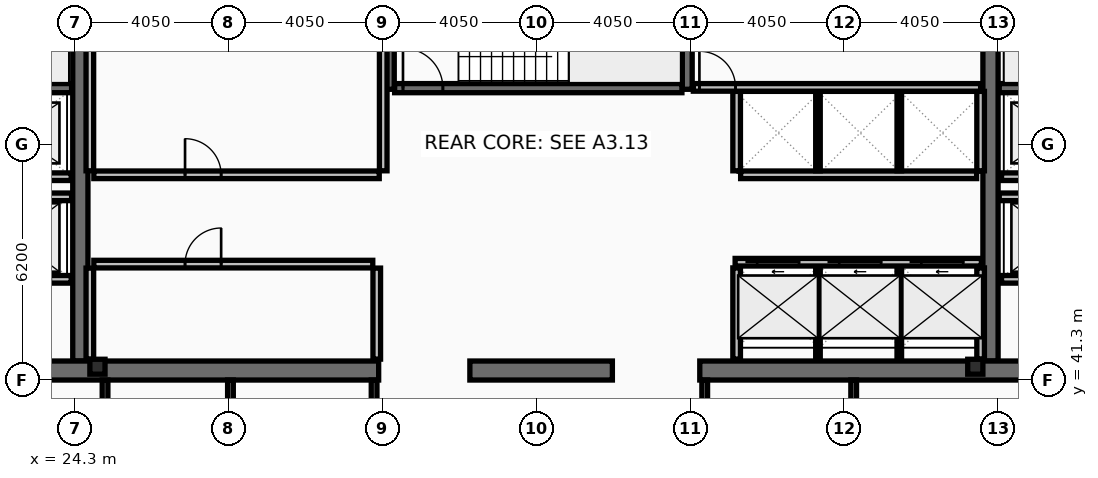
"""IFC4 building model, lengths in metres.
Left out: names, types, materials, properties, quantities, classifications, styles, units other than length and angle.
Written with IfcOpenShell. Run it as: python <this file> out.ifc"""

import sys

from ifc_helpers import new_model, si_unit, direction, frame, frame_2d, origin, origin_2d, place, context, subcontext, project, spatial, rectangle, i_section, extrude, element, fill, save


model = new_model("IFC4")
c1 = context("Model", 3, precision=1e-05, world=origin(), true_north=direction((0.0, 1.0)))
c2 = subcontext(c1, "Body", "Model", "MODEL_VIEW")
j1 = project(units=[si_unit("LENGTHUNIT", "METRE"), si_unit("PLANEANGLEUNIT", "RADIAN")], contexts=[c1])
p1 = place(None, origin())
s1 = spatial("IfcSite", under=j1, at=p1, CompositionType="ELEMENT")
p2 = place(p1, origin())
s2 = spatial("IfcBuilding", under=s1, at=p2, CompositionType="ELEMENT")
p3 = place(p2, frame((0.0, 0.0, 269.8)))
s3 = spatial("IfcBuildingStorey", under=s2, at=p3, CompositionType="ELEMENT", Elevation=269.8)
for number, where, z_axis, x_axis in (
    (1, (24.45, 41.8, 0.0), (0.0, 0.0, 1.0), (0.0, 1.0, 0.0)),
    (2, (48.4, 41.8, 0.0), (0.0, 0.0, 1.0), (0.0, 1.0, 0.0)),
):
    element("IfcWall", number, at=place(p3, frame(where, z_axis=z_axis, x_axis=x_axis)), inside=s3, PredefinedType="SHEAR", context=c2, shape_type="SweptSolid", body=[
        extrude(rectangle(XDim=11.4, YDim=0.4, at=frame_2d((5.7, 0.0))), origin(), (0.0, 0.0, 1.0), 3.44),
    ])
p4 = place(p3, frame((32.3, 41.55, 0.0), z_axis=(0.0, 0.0, 1.0), x_axis=(-1.0, 0.0, 0.0)))
e3 = element("IfcWall", 3, at=p4, inside=s3, PredefinedType="SHEAR", context=c2, shape_type="SweptSolid", body=[
    extrude(rectangle(XDim=11.45, YDim=0.5, at=frame_2d((5.725, 0.0))), origin(), (0.0, 0.0, 1.0), 3.44),
])
p5 = place(p3, frame((38.45, 41.55, 0.0), z_axis=(0.0, 0.0, 1.0), x_axis=(-1.0, 0.0, 0.0)))
e4 = element("IfcWall", 4, at=p5, inside=s3, PredefinedType="SHEAR", context=c2, shape_type="SweptSolid", body=[
    extrude(rectangle(XDim=3.75, YDim=0.5, at=frame_2d((1.875, 0.0))), origin(), (0.0, 0.0, 1.0), 3.44),
])
p6 = place(p3, frame((52.05, 41.55, 0.0), z_axis=(0.0, 0.0, 1.0), x_axis=(-1.0, 0.0, 0.0)))
e5 = element("IfcWall", 5, at=p6, inside=s3, PredefinedType="SHEAR", context=c2, shape_type="SweptSolid", body=[
    extrude(rectangle(XDim=11.3, YDim=0.5, at=frame_2d((5.65, 0.0))), origin(), (0.0, 0.0, 1.0), 3.44),
])
for number, where, z_axis, x_axis in (
    (6, (32.58, 48.95, 0.0), (0.0, 0.0, 1.0), (0.0, 1.0, 0.0)),
    (7, (40.42, 48.95, 0.0), (0.0, 0.0, 1.0), (0.0, 1.0, 0.0)),
):
    element("IfcWall", number, at=place(p3, frame(where, z_axis=z_axis, x_axis=x_axis)), inside=s3, PredefinedType="SHEAR", context=c2, shape_type="SweptSolid", body=[
        extrude(rectangle(XDim=4.25, YDim=0.26, at=frame_2d((2.125, 0.0))), origin(), (0.0, 0.0, 1.0), 3.44),
    ])
p7 = place(p3, frame((16.7, 48.98, 0.0), z_axis=(0.0, 0.0, 1.0), x_axis=(1.0, 0.0, 0.0)))
e8 = element("IfcWall", 8, at=p7, inside=s3, PredefinedType="SHEAR", context=c2, shape_type="SweptSolid", body=[
    extrude(rectangle(XDim=7.52, YDim=0.24, at=frame_2d((3.76, 0.0))), origin(), (0.0, 0.0, 1.0), 3.44),
])
p8 = place(p7, frame((0.22, 0.0, 0.0)))
e9 = element("IfcOpeningElement", 9, at=p8, cuts=e8, PredefinedType="OPENING", context=c2, shape_type="SweptSolid", body=[
    extrude(rectangle(XDim=1.05, YDim=2.15, at=frame_2d((0.525, 1.075))), frame((0.0, 0.13, 0.0), z_axis=(0.0, -1.0, 0.0), x_axis=(1.0, 0.0, 0.0)), (0.0, 0.0, 1.0), 0.26),
])
p9 = place(p3, frame((48.63, 48.98, 0.0), z_axis=(0.0, 0.0, 1.0), x_axis=(1.0, 0.0, 0.0)))
e10 = element("IfcWall", 10, at=p9, inside=s3, PredefinedType="SHEAR", context=c2, shape_type="SweptSolid", body=[
    extrude(rectangle(XDim=7.57, YDim=0.24, at=frame_2d((3.785, 0.0))), origin(), (0.0, 0.0, 1.0), 3.44),
])
p10 = place(p9, frame((6.3, 0.0, 0.0)))
e11 = element("IfcOpeningElement", 11, at=p10, cuts=e10, PredefinedType="OPENING", context=c2, shape_type="SweptSolid", body=[
    extrude(rectangle(XDim=1.05, YDim=2.15, at=frame_2d((0.525, 1.075))), frame((0.0, 0.13, 0.0), z_axis=(0.0, -1.0, 0.0), x_axis=(1.0, 0.0, 0.0)), (0.0, 0.0, 1.0), 0.26),
])
p11 = place(p3, frame((32.72, 48.98, 0.0), z_axis=(0.0, 0.0, 1.0), x_axis=(1.0, 0.0, 0.0)))
e12 = element("IfcWall", 12, at=p11, inside=s3, PredefinedType="SHEAR", context=c2, shape_type="SweptSolid", body=[
    extrude(rectangle(XDim=7.56, YDim=0.24, at=frame_2d((3.78, 0.0))), origin(), (0.0, 0.0, 1.0), 3.44),
])
p12 = place(p11, frame((0.22, 0.0, 0.0)))
e13 = element("IfcOpeningElement", 13, at=p12, cuts=e12, PredefinedType="OPENING", context=c2, shape_type="SweptSolid", body=[
    extrude(rectangle(XDim=1.05, YDim=2.15, at=frame_2d((0.525, 1.075))), frame((0.0, 0.13, 0.0), z_axis=(0.0, -1.0, 0.0), x_axis=(1.0, 0.0, 0.0)), (0.0, 0.0, 1.0), 0.26),
])
for number, where, z_axis, x_axis in (
    (14, (24.9, 41.65, 0.0), (0.0, 0.0, 1.0), (1.0, 0.0, 0.0)),
    (15, (48.0, 41.65, 0.0), (0.0, 0.0, 1.0), (1.0, 0.0, 0.0)),
):
    element("IfcColumn", number, at=place(p3, frame(where, z_axis=z_axis, x_axis=x_axis)), inside=s3, PredefinedType="COLUMN", context=c2, shape_type="SweptSolid", body=[
        extrude(i_section(OverallWidth=0.399, OverallDepth=0.393, WebThickness=0.023, FlangeThickness=0.037, at=origin_2d()), origin(), (0.0, 0.0, 1.0), 3.6),
    ])
p13 = place(p3, frame((41.68, 44.4, 0.0), z_axis=(0.0, 0.0, 1.0), x_axis=(1.0, 0.0, 0.0)))
e16 = element("IfcWall", 16, at=p13, inside=s3, PredefinedType="PARTITIONING", context=c2, shape_type="SweptSolid", body=[
    extrude(rectangle(XDim=6.48, YDim=0.2, at=frame_2d((3.24, 0.0))), origin(), (0.0, 0.0, 1.0), 3.44),
])
p14 = place(p13, frame((0.58, 0.0, 0.0)))
e17 = element("IfcOpeningElement", 17, at=p14, cuts=e16, PredefinedType="OPENING", context=c2, shape_type="SweptSolid", body=[
    extrude(rectangle(XDim=1.1, YDim=2.18, at=frame_2d((0.55, 1.09))), frame((0.0, 0.11, 0.0), z_axis=(0.0, -1.0, 0.0), x_axis=(1.0, 0.0, 0.0)), (0.0, 0.0, 1.0), 0.22),
])
p15 = place(p13, frame((2.74, 0.0, 0.0)))
e18 = element("IfcOpeningElement", 18, at=p15, cuts=e16, PredefinedType="OPENING", context=c2, shape_type="SweptSolid", body=[
    extrude(rectangle(XDim=1.1, YDim=2.18, at=frame_2d((0.55, 1.09))), frame((0.0, 0.11, 0.0), z_axis=(0.0, -1.0, 0.0), x_axis=(1.0, 0.0, 0.0)), (0.0, 0.0, 1.0), 0.22),
])
p16 = place(p13, frame((4.9, 0.0, 0.0)))
e19 = element("IfcOpeningElement", 19, at=p16, cuts=e16, PredefinedType="OPENING", context=c2, shape_type="SweptSolid", body=[
    extrude(rectangle(XDim=1.1, YDim=2.18, at=frame_2d((0.55, 1.09))), frame((0.0, 0.11, 0.0), z_axis=(0.0, -1.0, 0.0), x_axis=(1.0, 0.0, 0.0)), (0.0, 0.0, 1.0), 0.22),
])
p17 = place(p3, frame((51.61, 43.95, 0.0), z_axis=(0.0, 0.0, 1.0), x_axis=(-1.0, 0.0, 0.0)))
e20 = element("IfcWall", 20, at=p17, inside=s3, PredefinedType="PARTITIONING", context=c2, shape_type="SweptSolid", body=[
    extrude(rectangle(XDim=2.92, YDim=0.2, at=frame_2d((1.46, 0.0))), origin(), (0.0, 0.0, 1.0), 3.44),
])
p18 = place(p17, frame((0.81, 0.0, 0.0)))
e21 = element("IfcOpeningElement", 21, at=p18, cuts=e20, PredefinedType="OPENING", context=c2, shape_type="SweptSolid", body=[
    extrude(rectangle(XDim=1.3, YDim=2.18, at=frame_2d((0.65, 1.09))), frame((0.0, 0.11, 0.0), z_axis=(0.0, -1.0, 0.0), x_axis=(1.0, 0.0, 0.0)), (0.0, 0.0, 1.0), 0.22),
])
p19 = place(p3, frame((24.21, 43.95, 0.0), z_axis=(0.0, 0.0, 1.0), x_axis=(-1.0, 0.0, 0.0)))
e22 = element("IfcWall", 22, at=p19, inside=s3, PredefinedType="PARTITIONING", context=c2, shape_type="SweptSolid", body=[
    extrude(rectangle(XDim=2.97, YDim=0.2, at=frame_2d((1.485, 0.0))), origin(), (0.0, 0.0, 1.0), 3.44),
])
p20 = place(p19, frame((0.86, 0.0, 0.0)))
e23 = element("IfcOpeningElement", 23, at=p20, cuts=e22, PredefinedType="OPENING", context=c2, shape_type="SweptSolid", body=[
    extrude(rectangle(XDim=1.3, YDim=2.18, at=frame_2d((0.65, 1.09))), frame((0.0, 0.11, 0.0), z_axis=(0.0, -1.0, 0.0), x_axis=(1.0, 0.0, 0.0)), (0.0, 0.0, 1.0), 0.22),
])
p21 = place(p3, frame((51.61, 46.65, 0.0), z_axis=(0.0, 0.0, 1.0), x_axis=(-1.0, 0.0, 0.0)))
e24 = element("IfcWall", 24, at=p21, inside=s3, PredefinedType="PARTITIONING", context=c2, shape_type="SweptSolid", body=[
    extrude(rectangle(XDim=2.92, YDim=0.2, at=frame_2d((1.46, 0.0))), origin(), (0.0, 0.0, 1.0), 3.44),
])
p22 = place(p21, frame((0.86, 0.0, 0.0)))
e25 = element("IfcOpeningElement", 25, at=p22, cuts=e24, PredefinedType="OPENING", context=c2, shape_type="SweptSolid", body=[
    extrude(rectangle(XDim=1.2, YDim=2.18, at=frame_2d((0.6, 1.09))), frame((0.0, 0.11, 0.0), z_axis=(0.0, -1.0, 0.0), x_axis=(1.0, 0.0, 0.0)), (0.0, 0.0, 1.0), 0.22),
])
p23 = place(p3, frame((24.21, 46.65, 0.0), z_axis=(0.0, 0.0, 1.0), x_axis=(-1.0, 0.0, 0.0)))
e26 = element("IfcWall", 26, at=p23, inside=s3, PredefinedType="PARTITIONING", context=c2, shape_type="SweptSolid", body=[
    extrude(rectangle(XDim=2.97, YDim=0.2, at=frame_2d((1.485, 0.0))), origin(), (0.0, 0.0, 1.0), 3.44),
])
p24 = place(p23, frame((0.91, 0.0, 0.0)))
e27 = element("IfcOpeningElement", 27, at=p24, cuts=e26, PredefinedType="OPENING", context=c2, shape_type="SweptSolid", body=[
    extrude(rectangle(XDim=1.2, YDim=2.18, at=frame_2d((0.6, 1.09))), frame((0.0, 0.11, 0.0), z_axis=(0.0, -1.0, 0.0), x_axis=(1.0, 0.0, 0.0)), (0.0, 0.0, 1.0), 0.22),
])
p25 = place(p3, frame((21.2, 46.12, 0.0), z_axis=(0.0, 0.0, 1.0), x_axis=(1.0, 0.0, 0.0)))
e28 = element("IfcWall", 28, at=p25, inside=s3, PredefinedType="PARTITIONING", context=c2, shape_type="SweptSolid", body=[
    extrude(rectangle(XDim=3.02, YDim=0.2, at=frame_2d((1.51, 0.0))), origin(), (0.0, 0.0, 1.0), 3.44),
])
p26 = place(p3, frame((48.63, 46.12, 0.0), z_axis=(0.0, 0.0, 1.0), x_axis=(1.0, 0.0, 0.0)))
e29 = element("IfcWall", 29, at=p26, inside=s3, PredefinedType="PARTITIONING", context=c2, shape_type="SweptSolid", body=[
    extrude(rectangle(XDim=3.07, YDim=0.2, at=frame_2d((1.535, 0.0))), origin(), (0.0, 0.0, 1.0), 3.44),
])
for number, where, z_axis, x_axis in (
    (30, (24.7, 46.805, 0.0), (0.0, 0.0, 1.0), (0.0, 1.0, 0.0)),
    (31, (32.42, 46.805, 0.0), (0.0, 0.0, 1.0), (0.0, 1.0, 0.0)),
):
    element("IfcWall", number, at=place(p3, frame(where, z_axis=z_axis, x_axis=x_axis)), inside=s3, PredefinedType="PARTITIONING", context=c2, shape_type="SweptSolid", body=[
        extrude(rectangle(XDim=5.99, YDim=0.2, at=frame_2d((2.995, 0.0))), origin(), (0.0, 0.0, 1.0), 3.44),
    ])
p27 = place(p3, frame((24.805, 46.7, 0.0), z_axis=(0.0, 0.0, 1.0), x_axis=(1.0, 0.0, 0.0)))
e32 = element("IfcWall", 32, at=p27, inside=s3, PredefinedType="PARTITIONING", context=c2, shape_type="SweptSolid", body=[
    extrude(rectangle(XDim=7.51, YDim=0.2, at=frame_2d((3.755, 0.0))), origin(), (0.0, 0.0, 1.0), 3.44),
])
p28 = place(p27, frame((2.4, 0.0, 0.0)))
e33 = element("IfcOpeningElement", 33, at=p28, cuts=e32, PredefinedType="OPENING", context=c2, shape_type="SweptSolid", body=[
    extrude(rectangle(XDim=0.95, YDim=2.1, at=frame_2d((0.475, 1.05))), frame((0.0, 0.11, 0.0), z_axis=(0.0, -1.0, 0.0), x_axis=(1.0, 0.0, 0.0)), (0.0, 0.0, 1.0), 0.22),
])
for number, where, z_axis, x_axis in (
    (34, (24.7, 41.85, 0.0), (0.0, 0.0, 1.0), (0.0, 1.0, 0.0)),
    (35, (32.25, 41.85, 0.0), (0.0, 0.0, 1.0), (0.0, 1.0, 0.0)),
):
    element("IfcWall", number, at=place(p3, frame(where, z_axis=z_axis, x_axis=x_axis)), inside=s3, PredefinedType="PARTITIONING", context=c2, shape_type="SweptSolid", body=[
        extrude(rectangle(XDim=2.395, YDim=0.2, at=frame_2d((1.198, 0.0))), origin(), (0.0, 0.0, 1.0), 3.44),
    ])
p29 = place(p3, frame((24.805, 44.35, 0.0), z_axis=(0.0, 0.0, 1.0), x_axis=(1.0, 0.0, 0.0)))
e36 = element("IfcWall", 36, at=p29, inside=s3, PredefinedType="PARTITIONING", context=c2, shape_type="SweptSolid", body=[
    extrude(rectangle(XDim=7.34, YDim=0.2, at=frame_2d((3.67, 0.0))), origin(), (0.0, 0.0, 1.0), 3.44),
])
p30 = place(p29, frame((2.4, 0.0, 0.0)))
e37 = element("IfcOpeningElement", 37, at=p30, cuts=e36, PredefinedType="OPENING", context=c2, shape_type="SweptSolid", body=[
    extrude(rectangle(XDim=0.95, YDim=2.1, at=frame_2d((0.475, 1.05))), frame((0.0, 0.11, 0.0), z_axis=(0.0, -1.0, 0.0), x_axis=(1.0, 0.0, 0.0)), (0.0, 0.0, 1.0), 0.22),
])
p31 = place(p3, frame((41.825, 46.7, 0.0), z_axis=(0.0, 0.0, 1.0), x_axis=(1.0, 0.0, 0.0)))
e38 = element("IfcWall", 38, at=p31, inside=s3, PredefinedType="PARTITIONING", context=c2, shape_type="SweptSolid", body=[
    extrude(rectangle(XDim=6.21, YDim=0.2, at=frame_2d((3.105, 0.0))), origin(), (0.0, 0.0, 1.0), 3.44),
])
for number, where, z_axis, x_axis in (
    (39, (41.72, 46.805, 0.0), (0.0, 0.0, 1.0), (0.0, 1.0, 0.0)),
    (40, (48.14, 46.805, 0.0), (0.0, 0.0, 1.0), (0.0, 1.0, 0.0)),
):
    element("IfcWall", number, at=place(p3, frame(where, z_axis=z_axis, x_axis=x_axis)), inside=s3, PredefinedType="PARTITIONING", context=c2, shape_type="SweptSolid", body=[
        extrude(rectangle(XDim=2.09, YDim=0.2, at=frame_2d((1.045, 0.0))), origin(), (0.0, 0.0, 1.0), 3.44),
    ])
for number, where, z_axis, x_axis in (
    (41, (43.86, 46.805, 0.0), (0.0, 0.0, 1.0), (0.0, 1.0, 0.0)),
    (42, (46.0, 46.805, 0.0), (0.0, 0.0, 1.0), (0.0, 1.0, 0.0)),
):
    element("IfcWall", number, at=place(p3, frame(where, z_axis=z_axis, x_axis=x_axis)), inside=s3, PredefinedType="PARTITIONING", context=c2, shape_type="SweptSolid", body=[
        extrude(rectangle(XDim=2.09, YDim=0.12, at=frame_2d((1.045, 0.0))), origin(), (0.0, 0.0, 1.0), 3.44),
    ])
for number, where, z_axis, x_axis in (
    (43, (41.72, 41.85, 0.0), (0.0, 0.0, 1.0), (0.0, 1.0, 0.0)),
    (44, (48.14, 41.85, 0.0), (0.0, 0.0, 1.0), (0.0, 1.0, 0.0)),
):
    element("IfcWall", number, at=place(p3, frame(where, z_axis=z_axis, x_axis=x_axis)), inside=s3, PredefinedType="PARTITIONING", context=c2, shape_type="SweptSolid", body=[
        extrude(rectangle(XDim=2.4, YDim=0.2, at=frame_2d((1.2, 0.0))), origin(), (0.0, 0.0, 1.0), 3.44),
    ])
for number, where, z_axis, x_axis in (
    (45, (43.86, 41.85, 0.0), (0.0, 0.0, 1.0), (0.0, 1.0, 0.0)),
    (46, (46.0, 41.85, 0.0), (0.0, 0.0, 1.0), (0.0, 1.0, 0.0)),
):
    element("IfcWall", number, at=place(p3, frame(where, z_axis=z_axis, x_axis=x_axis)), inside=s3, PredefinedType="PARTITIONING", context=c2, shape_type="SweptSolid", body=[
        extrude(rectangle(XDim=2.4, YDim=0.12, at=frame_2d((1.2, 0.0))), origin(), (0.0, 0.0, 1.0), 3.44),
    ])
p32 = place(p3, frame((40.58, 49.0, 0.0), z_axis=(0.0, 0.0, 1.0), x_axis=(1.0, 0.0, 0.0)))
e47 = element("IfcWall", 47, at=p32, inside=s3, PredefinedType="PARTITIONING", context=c2, shape_type="SweptSolid", body=[
    extrude(rectangle(XDim=7.56, YDim=0.2, at=frame_2d((3.78, 0.0))), origin(), (0.0, 0.0, 1.0), 3.44),
])
p33 = place(p32, frame((0.16, 0.0, 0.0)))
e48 = element("IfcOpeningElement", 48, at=p33, cuts=e47, PredefinedType="OPENING", context=c2, shape_type="SweptSolid", body=[
    extrude(rectangle(XDim=0.95, YDim=2.1, at=frame_2d((0.475, 1.05))), frame((0.0, 0.11, 0.0), z_axis=(0.0, -1.0, 0.0), x_axis=(1.0, 0.0, 0.0)), (0.0, 0.0, 1.0), 0.22),
])
p34 = place(p3, frame((25.1, 38.28, 0.0), z_axis=(0.0, 0.0, 1.0), x_axis=(0.0, 1.0, 0.0)))
e49 = element("IfcWall", 49, at=p34, inside=s3, PredefinedType="PARTITIONING", context=c2, shape_type="SweptSolid", body=[
    extrude(rectangle(XDim=3.02, YDim=0.15, at=frame_2d((1.51, 0.0))), origin(), (0.0, 0.0, 1.0), 2.78),
])
for number, where, z_axis, x_axis in (
    (50, (28.4, 38.28, 0.0), (0.0, 0.0, 1.0), (0.0, 1.0, 0.0)),
    (51, (32.18, 38.28, 0.0), (0.0, 0.0, 1.0), (0.0, 1.0, 0.0)),
    (52, (40.88, 38.28, 0.0), (0.0, 0.0, 1.0), (0.0, 1.0, 0.0)),
    (53, (44.8, 38.28, 0.0), (0.0, 0.0, 1.0), (0.0, 1.0, 0.0)),
):
    element("IfcWall", number, at=place(p3, frame(where, z_axis=z_axis, x_axis=x_axis)), inside=s3, PredefinedType="PARTITIONING", context=c2, shape_type="SweptSolid", body=[
        extrude(rectangle(XDim=3.02, YDim=0.15, at=frame_2d((1.51, 0.0))), origin(), (0.0, 0.0, 1.0), 3.44),
    ])
p35 = place(p12, origin())
e54 = element("IfcDoor", 54, at=p35, inside=s3, OperationType="SINGLE_SWING_LEFT", PredefinedType="DOOR", context=c2, shape_type="SweptSolid", body=[
    extrude(rectangle(XDim=1.05, YDim=2.15, at=frame_2d((0.525, 1.075))), frame((0.0, 0.025, 0.0), z_axis=(0.0, -1.0, 0.0), x_axis=(1.0, 0.0, 0.0)), (0.0, 0.0, 1.0), 0.05),
])
fill(e13, e54)
p36 = place(p14, origin())
e55 = element("IfcDoor", 55, at=p36, inside=s3, OperationType="SLIDING_TO_LEFT", PredefinedType="DOOR", context=c2, shape_type="SweptSolid", body=[
    extrude(rectangle(XDim=1.1, YDim=2.18, at=frame_2d((0.55, 1.09))), frame((0.0, 0.025, 0.0), z_axis=(0.0, -1.0, 0.0), x_axis=(1.0, 0.0, 0.0)), (0.0, 0.0, 1.0), 0.05),
])
fill(e17, e55)
p37 = place(p15, origin())
e56 = element("IfcDoor", 56, at=p37, inside=s3, OperationType="SLIDING_TO_LEFT", PredefinedType="DOOR", context=c2, shape_type="SweptSolid", body=[
    extrude(rectangle(XDim=1.1, YDim=2.18, at=frame_2d((0.55, 1.09))), frame((0.0, 0.025, 0.0), z_axis=(0.0, -1.0, 0.0), x_axis=(1.0, 0.0, 0.0)), (0.0, 0.0, 1.0), 0.05),
])
fill(e18, e56)
p38 = place(p16, origin())
e57 = element("IfcDoor", 57, at=p38, inside=s3, OperationType="SLIDING_TO_LEFT", PredefinedType="DOOR", context=c2, shape_type="SweptSolid", body=[
    extrude(rectangle(XDim=1.1, YDim=2.18, at=frame_2d((0.55, 1.09))), frame((0.0, 0.025, 0.0), z_axis=(0.0, -1.0, 0.0), x_axis=(1.0, 0.0, 0.0)), (0.0, 0.0, 1.0), 0.05),
])
fill(e19, e57)
p39 = place(p28, origin())
e58 = element("IfcDoor", 58, at=p39, inside=s3, OperationType="SINGLE_SWING_LEFT", PredefinedType="DOOR", context=c2, shape_type="SweptSolid", body=[
    extrude(rectangle(XDim=0.95, YDim=2.1, at=frame_2d((0.475, 1.05))), frame((0.0, 0.025, 0.0), z_axis=(0.0, -1.0, 0.0), x_axis=(1.0, 0.0, 0.0)), (0.0, 0.0, 1.0), 0.05),
])
fill(e33, e58)
p40 = place(p30, origin())
e59 = element("IfcDoor", 59, at=p40, inside=s3, OperationType="SINGLE_SWING_RIGHT", PredefinedType="DOOR", context=c2, shape_type="SweptSolid", body=[
    extrude(rectangle(XDim=0.95, YDim=2.1, at=frame_2d((0.475, 1.05))), frame((0.0, 0.025, 0.0), z_axis=(0.0, -1.0, 0.0), x_axis=(1.0, 0.0, 0.0)), (0.0, 0.0, 1.0), 0.05),
])
fill(e37, e59)
p41 = place(p33, origin())
e60 = element("IfcDoor", 60, at=p41, inside=s3, OperationType="SINGLE_SWING_LEFT", PredefinedType="DOOR", context=c2, shape_type="SweptSolid", body=[
    extrude(rectangle(XDim=0.95, YDim=2.1, at=frame_2d((0.475, 1.05))), frame((0.0, 0.025, 0.0), z_axis=(0.0, -1.0, 0.0), x_axis=(1.0, 0.0, 0.0)), (0.0, 0.0, 1.0), 0.05),
])
fill(e48, e60)
save(model, sys.argv[1])
